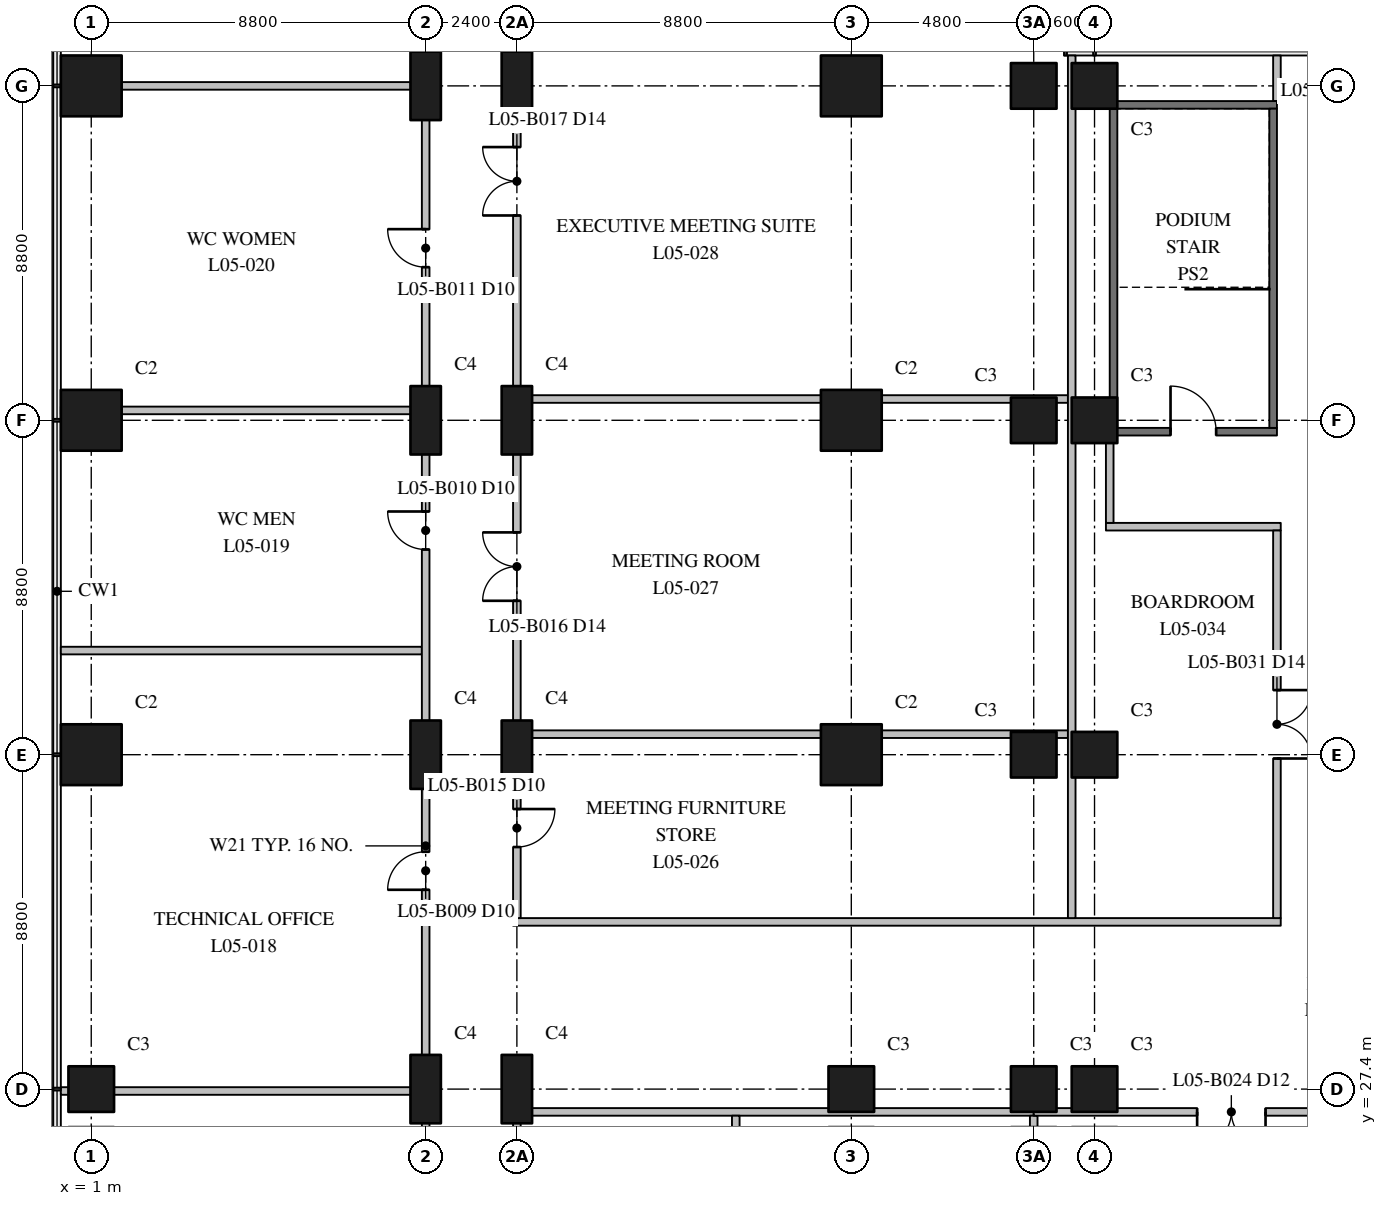
"""IFC4 building model, lengths in metres.
Left out: names, types, materials, properties, quantities, classifications, styles, units other than length and angle.
Written with IfcOpenShell. Run it as: python <this file> out.ifc"""

import sys

from ifc_helpers import new_model, si_unit, direction, frame, frame_2d, origin, origin_2d, place, context, subcontext, project, spatial, rectangle, extrude, element, fill, save


model = new_model("IFC4")
c1 = context("Model", 3, precision=1e-05, world=origin(), true_north=direction((0.0, 1.0)))
c2 = subcontext(c1, "Body", "Model", "MODEL_VIEW")
j1 = project(units=[si_unit("LENGTHUNIT", "METRE"), si_unit("PLANEANGLEUNIT", "RADIAN")], contexts=[c1])
p1 = place(None, origin())
s1 = spatial("IfcSite", under=j1, at=p1, CompositionType="ELEMENT")
p2 = place(p1, origin())
s2 = spatial("IfcBuilding", under=s1, at=p2, CompositionType="ELEMENT")
p3 = place(p2, frame((0.0, 0.0, 29.0)))
s3 = spatial("IfcBuildingStorey", under=s2, at=p3, CompositionType="ELEMENT", Elevation=29.0)
p4 = place(p3, frame((1.0, 27.4, 0.0), z_axis=(0.0, 0.0, 1.0), x_axis=(1.0, 0.0, 0.0)))
e1 = element("IfcColumn", 1, at=p4, inside=s3, PredefinedType="COLUMN", context=c2, shape_type="SweptSolid", body=[
    extrude(rectangle(XDim=1.2, YDim=1.2, at=origin_2d()), origin(), (0.0, 0.0, 1.0), 5.0),
])
for number, where, z_axis, x_axis in (
    (2, (1.0, 36.2, 0.0), (0.0, 0.0, 1.0), (1.0, 0.0, 0.0)),
    (3, (1.0, 45.0, 0.0), (0.0, 0.0, 1.0), (1.0, 0.0, 0.0)),
    (4, (1.0, 53.8, 0.0), (0.0, 0.0, 1.0), (1.0, 0.0, 0.0)),
):
    element("IfcColumn", number, at=place(p3, frame(where, z_axis=z_axis, x_axis=x_axis)), inside=s3, PredefinedType="COLUMN", context=c2, shape_type="SweptSolid", body=[
        extrude(rectangle(XDim=1.6, YDim=1.6, at=origin_2d()), origin(), (0.0, 0.0, 1.0), 5.0),
    ])
for number, where, z_axis, x_axis in (
    (5, (9.8, 27.4, 0.0), (0.0, 0.0, 1.0), (0.0, 1.0, 0.0)),
    (6, (9.8, 36.2, 0.0), (0.0, 0.0, 1.0), (0.0, 1.0, 0.0)),
    (7, (9.8, 45.0, 0.0), (0.0, 0.0, 1.0), (0.0, 1.0, 0.0)),
    (8, (9.8, 53.8, 0.0), (0.0, 0.0, 1.0), (0.0, 1.0, 0.0)),
    (9, (12.2, 27.4, 0.0), (0.0, 0.0, 1.0), (0.0, 1.0, 0.0)),
    (10, (12.2, 36.2, 0.0), (0.0, 0.0, 1.0), (0.0, 1.0, 0.0)),
    (11, (12.2, 45.0, 0.0), (0.0, 0.0, 1.0), (0.0, 1.0, 0.0)),
    (12, (12.2, 53.8, 0.0), (0.0, 0.0, 1.0), (0.0, 1.0, 0.0)),
):
    element("IfcColumn", number, at=place(p3, frame(where, z_axis=z_axis, x_axis=x_axis)), inside=s3, PredefinedType="COLUMN", context=c2, shape_type="SweptSolid", body=[
        extrude(rectangle(XDim=1.8, YDim=0.8, at=origin_2d()), origin(), (0.0, 0.0, 1.0), 5.0),
    ])
p5 = place(p3, frame((21.0, 27.4, 0.0), z_axis=(0.0, 0.0, 1.0), x_axis=(1.0, 0.0, 0.0)))
e13 = element("IfcColumn", 13, at=p5, inside=s3, PredefinedType="COLUMN", context=c2, shape_type="SweptSolid", body=[
    extrude(rectangle(XDim=1.2, YDim=1.2, at=origin_2d()), origin(), (0.0, 0.0, 1.0), 5.0),
])
for number, where, z_axis, x_axis in (
    (14, (21.0, 36.2, 0.0), (0.0, 0.0, 1.0), (1.0, 0.0, 0.0)),
    (15, (21.0, 45.0, 0.0), (0.0, 0.0, 1.0), (1.0, 0.0, 0.0)),
    (16, (21.0, 53.8, 0.0), (0.0, 0.0, 1.0), (1.0, 0.0, 0.0)),
):
    element("IfcColumn", number, at=place(p3, frame(where, z_axis=z_axis, x_axis=x_axis)), inside=s3, PredefinedType="COLUMN", context=c2, shape_type="SweptSolid", body=[
        extrude(rectangle(XDim=1.6, YDim=1.6, at=origin_2d()), origin(), (0.0, 0.0, 1.0), 5.0),
    ])
for number, where, z_axis, x_axis in (
    (17, (25.8, 27.4, 0.0), (0.0, 0.0, 1.0), (1.0, 0.0, 0.0)),
    (18, (25.8, 36.2, 0.0), (0.0, 0.0, 1.0), (1.0, 0.0, 0.0)),
    (19, (25.8, 45.0, 0.0), (0.0, 0.0, 1.0), (1.0, 0.0, 0.0)),
    (20, (25.8, 53.8, 0.0), (0.0, 0.0, 1.0), (1.0, 0.0, 0.0)),
    (21, (27.4, 27.4, 0.0), (0.0, 0.0, 1.0), (1.0, 0.0, 0.0)),
    (22, (27.4, 36.2, 0.0), (0.0, 0.0, 1.0), (1.0, 0.0, 0.0)),
    (23, (27.4, 45.0, 0.0), (0.0, 0.0, 1.0), (1.0, 0.0, 0.0)),
    (24, (27.4, 53.8, 0.0), (0.0, 0.0, 1.0), (1.0, 0.0, 0.0)),
):
    element("IfcColumn", number, at=place(p3, frame(where, z_axis=z_axis, x_axis=x_axis)), inside=s3, PredefinedType="COLUMN", context=c2, shape_type="SweptSolid", body=[
        extrude(rectangle(XDim=1.2, YDim=1.2, at=origin_2d()), origin(), (0.0, 0.0, 1.0), 5.0),
    ])
p6 = place(p3, frame((27.8, 44.7, 0.0), z_axis=(0.0, 0.0, 1.0), x_axis=(1.0, 0.0, 0.0)))
e25 = element("IfcWall", 25, at=p6, inside=s3, PredefinedType="SHEAR", context=c2, shape_type="SweptSolid", body=[
    extrude(rectangle(XDim=4.4, YDim=0.2, at=frame_2d((2.2, 0.0))), origin(), (0.0, 0.0, 1.0), 4.6),
])
p7 = place(p6, frame((1.6, 0.0, 0.0)))
e26 = element("IfcOpeningElement", 26, at=p7, cuts=e25, PredefinedType="OPENING", context=c2, shape_type="SweptSolid", body=[
    extrude(rectangle(XDim=1.2, YDim=2.1, at=frame_2d((0.6, 1.05))), frame((0.0, 0.11, 0.0), z_axis=(0.0, -1.0, 0.0), x_axis=(1.0, 0.0, 0.0)), (0.0, 0.0, 1.0), 0.22),
])
p8 = place(p3, frame((27.8, 53.3, 0.0), z_axis=(0.0, 0.0, 1.0), x_axis=(1.0, 0.0, 0.0)))
e27 = element("IfcWall", 27, at=p8, inside=s3, PredefinedType="SHEAR", context=c2, shape_type="SweptSolid", body=[
    extrude(rectangle(XDim=4.4, YDim=0.2, at=frame_2d((2.2, 0.0))), origin(), (0.0, 0.0, 1.0), 4.6),
])
for number, where, z_axis, x_axis in (
    (28, (27.9, 44.8, 0.0), (0.0, 0.0, 1.0), (0.0, 1.0, 0.0)),
    (29, (32.1, 44.8, 0.0), (0.0, 0.0, 1.0), (0.0, 1.0, 0.0)),
):
    element("IfcWall", number, at=place(p3, frame(where, z_axis=z_axis, x_axis=x_axis)), inside=s3, PredefinedType="SHEAR", context=c2, shape_type="SweptSolid", body=[
        extrude(rectangle(XDim=8.4, YDim=0.2, at=frame_2d((4.2, 0.0))), origin(), (0.0, 0.0, 1.0), 4.6),
    ])
p9 = place(p3, frame((12.1, 26.8, 0.0), z_axis=(0.0, 0.0, 1.0), x_axis=(1.0, 0.0, 0.0)))
e30 = element("IfcWall", 30, at=p9, inside=s3, PredefinedType="PARTITIONING", context=c2, shape_type="SweptSolid", body=[
    extrude(rectangle(XDim=13.7, YDim=0.2, at=frame_2d((6.85, 0.0))), origin(), (0.0, 0.0, 1.0), 4.55),
])
p10 = place(p3, frame((25.8, 26.8, 0.0), z_axis=(0.0, 0.0, 1.0), x_axis=(1.0, 0.0, 0.0)))
e31 = element("IfcWall", 31, at=p10, inside=s3, PredefinedType="PARTITIONING", context=c2, shape_type="SweptSolid", body=[
    extrude(rectangle(XDim=10.4, YDim=0.2, at=frame_2d((5.2, 0.0))), origin(), (0.0, 0.0, 1.0), 4.55),
])
p11 = place(p10, frame((4.3, 0.0, 0.0)))
e32 = element("IfcOpeningElement", 32, at=p11, cuts=e31, PredefinedType="OPENING", context=c2, shape_type="SweptSolid", body=[
    extrude(rectangle(XDim=1.8, YDim=2.1, at=frame_2d((0.9, 1.05))), frame((0.0, 0.11, 0.0), z_axis=(0.0, -1.0, 0.0), x_axis=(1.0, 0.0, 0.0)), (0.0, 0.0, 1.0), 0.22),
])
p12 = place(p3, frame((12.1, 31.8, 0.0), z_axis=(0.0, 0.0, 1.0), x_axis=(1.0, 0.0, 0.0)))
e33 = element("IfcWall", 33, at=p12, inside=s3, PredefinedType="PARTITIONING", context=c2, shape_type="SweptSolid", body=[
    extrude(rectangle(XDim=20.2, YDim=0.2, at=frame_2d((10.1, 0.0))), origin(), (0.0, 0.0, 1.0), 4.55),
])
p13 = place(p3, frame((27.7, 42.2, 0.0), z_axis=(0.0, 0.0, 1.0), x_axis=(1.0, 0.0, 0.0)))
e34 = element("IfcWall", 34, at=p13, inside=s3, PredefinedType="PARTITIONING", context=c2, shape_type="SweptSolid", body=[
    extrude(rectangle(XDim=4.6, YDim=0.2, at=frame_2d((2.3, 0.0))), origin(), (0.0, 0.0, 1.0), 4.55),
])
for number, where, z_axis, x_axis in (
    (35, (0.2, 27.35, 0.0), (0.0, 0.0, 1.0), (1.0, 0.0, 0.0)),
    (36, (0.2, 38.94, 0.0), (0.0, 0.0, 1.0), (1.0, 0.0, 0.0)),
    (37, (0.2, 45.26, 0.0), (0.0, 0.0, 1.0), (1.0, 0.0, 0.0)),
    (38, (0.2, 53.8, 0.0), (0.0, 0.0, 1.0), (1.0, 0.0, 0.0)),
):
    element("IfcWall", number, at=place(p3, frame(where, z_axis=z_axis, x_axis=x_axis)), inside=s3, PredefinedType="PARTITIONING", context=c2, shape_type="SweptSolid", body=[
        extrude(rectangle(XDim=9.5, YDim=0.2, at=frame_2d((4.75, 0.0))), origin(), (0.0, 0.0, 1.0), 4.55),
    ])
for number, where, z_axis, x_axis in (
    (39, (12.3, 36.74, 0.0), (0.0, 0.0, 1.0), (1.0, 0.0, 0.0)),
    (40, (12.3, 45.56, 0.0), (0.0, 0.0, 1.0), (1.0, 0.0, 0.0)),
):
    element("IfcWall", number, at=place(p3, frame(where, z_axis=z_axis, x_axis=x_axis)), inside=s3, PredefinedType="PARTITIONING", context=c2, shape_type="SweptSolid", body=[
        extrude(rectangle(XDim=14.4, YDim=0.2, at=frame_2d((7.2, 0.0))), origin(), (0.0, 0.0, 1.0), 4.55),
    ])
p14 = place(p3, frame((9.8, 9.8, 0.0), z_axis=(0.0, 0.0, 1.0), x_axis=(0.0, 1.0, 0.0)))
e41 = element("IfcWall", 41, at=p14, inside=s3, PredefinedType="PARTITIONING", context=c2, shape_type="SweptSolid", body=[
    extrude(rectangle(XDim=48.0, YDim=0.2, at=frame_2d((24.0, 0.0))), origin(), (0.0, 0.0, 1.0), 4.55),
])
p15 = place(p14, frame((5.02, 0.0, 0.0)))
e42 = element("IfcOpeningElement", 42, at=p15, cuts=e41, PredefinedType="OPENING", context=c2, shape_type="SweptSolid", body=[
    extrude(rectangle(XDim=1.0, YDim=2.1, at=frame_2d((0.5, 1.05))), frame((0.0, 0.11, 0.0), z_axis=(0.0, -1.0, 0.0), x_axis=(1.0, 0.0, 0.0)), (0.0, 0.0, 1.0), 0.22),
])
p16 = place(p14, frame((12.595, 0.0, 0.0)))
e43 = element("IfcOpeningElement", 43, at=p16, cuts=e41, PredefinedType="OPENING", context=c2, shape_type="SweptSolid", body=[
    extrude(rectangle(XDim=1.0, YDim=2.1, at=frame_2d((0.5, 1.05))), frame((0.0, 0.11, 0.0), z_axis=(0.0, -1.0, 0.0), x_axis=(1.0, 0.0, 0.0)), (0.0, 0.0, 1.0), 0.22),
])
p17 = place(p14, frame((22.845, 0.0, 0.0)))
e44 = element("IfcOpeningElement", 44, at=p17, cuts=e41, PredefinedType="OPENING", context=c2, shape_type="SweptSolid", body=[
    extrude(rectangle(XDim=1.0, YDim=2.1, at=frame_2d((0.5, 1.05))), frame((0.0, 0.11, 0.0), z_axis=(0.0, -1.0, 0.0), x_axis=(1.0, 0.0, 0.0)), (0.0, 0.0, 1.0), 0.22),
])
p18 = place(p14, frame((31.8, 0.0, 0.0)))
e45 = element("IfcOpeningElement", 45, at=p18, cuts=e41, PredefinedType="OPENING", context=c2, shape_type="SweptSolid", body=[
    extrude(rectangle(XDim=1.0, YDim=2.1, at=frame_2d((0.5, 1.05))), frame((0.0, 0.11, 0.0), z_axis=(0.0, -1.0, 0.0), x_axis=(1.0, 0.0, 0.0)), (0.0, 0.0, 1.0), 0.22),
])
p19 = place(p14, frame((39.23, 0.0, 0.0)))
e46 = element("IfcOpeningElement", 46, at=p19, cuts=e41, PredefinedType="OPENING", context=c2, shape_type="SweptSolid", body=[
    extrude(rectangle(XDim=1.0, YDim=2.1, at=frame_2d((0.5, 1.05))), frame((0.0, 0.11, 0.0), z_axis=(0.0, -1.0, 0.0), x_axis=(1.0, 0.0, 0.0)), (0.0, 0.0, 1.0), 0.22),
])
p20 = place(p14, frame((44.967, 0.0, 0.0)))
e47 = element("IfcOpeningElement", 47, at=p20, cuts=e41, PredefinedType="OPENING", context=c2, shape_type="SweptSolid", body=[
    extrude(rectangle(XDim=1.0, YDim=2.1, at=frame_2d((0.5, 1.05))), frame((0.0, 0.11, 0.0), z_axis=(0.0, -1.0, 0.0), x_axis=(1.0, 0.0, 0.0)), (0.0, 0.0, 1.0), 0.22),
])
p21 = place(p14, frame((0.4, 0.0, 0.0)))
e48 = element("IfcOpeningElement", 48, at=p21, cuts=e41, PredefinedType="OPENING", context=c2, shape_type="SweptSolid", body=[
    extrude(rectangle(XDim=1.0, YDim=2.1, at=frame_2d((0.5, 1.05))), frame((0.0, 0.11, 0.0), z_axis=(0.0, -1.0, 0.0), x_axis=(1.0, 0.0, 0.0)), (0.0, 0.0, 1.0), 0.22),
])
p22 = place(p3, frame((12.2, 12.3, 0.0), z_axis=(0.0, 0.0, 1.0), x_axis=(0.0, 1.0, 0.0)))
e49 = element("IfcWall", 49, at=p22, inside=s3, PredefinedType="PARTITIONING", context=c2, shape_type="SweptSolid", body=[
    extrude(rectangle(XDim=14.4, YDim=0.2, at=frame_2d((7.2, 0.0))), origin(), (0.0, 0.0, 1.0), 4.55),
])
p23 = place(p3, frame((12.2, 31.9, 0.0), z_axis=(0.0, 0.0, 1.0), x_axis=(0.0, 1.0, 0.0)))
e50 = element("IfcWall", 50, at=p23, inside=s3, PredefinedType="PARTITIONING", context=c2, shape_type="SweptSolid", body=[
    extrude(rectangle(XDim=46.3, YDim=0.2, at=frame_2d((23.15, 0.0))), origin(), (0.0, 0.0, 1.0), 4.55),
])
p24 = place(p23, frame((1.87, 0.0, 0.0)))
e51 = element("IfcOpeningElement", 51, at=p24, cuts=e50, PredefinedType="OPENING", context=c2, shape_type="SweptSolid", body=[
    extrude(rectangle(XDim=1.0, YDim=2.1, at=frame_2d((0.5, 1.05))), frame((0.0, 0.11, 0.0), z_axis=(0.0, -1.0, 0.0), x_axis=(1.0, 0.0, 0.0)), (0.0, 0.0, 1.0), 0.22),
])
p25 = place(p23, frame((8.35, 0.0, 0.0)))
e52 = element("IfcOpeningElement", 52, at=p25, cuts=e50, PredefinedType="OPENING", context=c2, shape_type="SweptSolid", body=[
    extrude(rectangle(XDim=1.8, YDim=2.4, at=frame_2d((0.9, 1.2))), frame((0.0, 0.11, 0.0), z_axis=(0.0, -1.0, 0.0), x_axis=(1.0, 0.0, 0.0)), (0.0, 0.0, 1.0), 0.22),
])
p26 = place(p23, frame((18.49, 0.0, 0.0)))
e53 = element("IfcOpeningElement", 53, at=p26, cuts=e50, PredefinedType="OPENING", context=c2, shape_type="SweptSolid", body=[
    extrude(rectangle(XDim=1.8, YDim=2.4, at=frame_2d((0.9, 1.2))), frame((0.0, 0.11, 0.0), z_axis=(0.0, -1.0, 0.0), x_axis=(1.0, 0.0, 0.0)), (0.0, 0.0, 1.0), 0.22),
])
p27 = place(p23, frame((27.955, 0.0, 0.0)))
e54 = element("IfcOpeningElement", 54, at=p27, cuts=e50, PredefinedType="OPENING", context=c2, shape_type="SweptSolid", body=[
    extrude(rectangle(XDim=1.8, YDim=2.4, at=frame_2d((0.9, 1.2))), frame((0.0, 0.11, 0.0), z_axis=(0.0, -1.0, 0.0), x_axis=(1.0, 0.0, 0.0)), (0.0, 0.0, 1.0), 0.22),
])
p28 = place(p23, frame((36.76, 0.0, 0.0)))
e55 = element("IfcOpeningElement", 55, at=p28, cuts=e50, PredefinedType="OPENING", context=c2, shape_type="SweptSolid", body=[
    extrude(rectangle(XDim=1.8, YDim=2.4, at=frame_2d((0.9, 1.2))), frame((0.0, 0.11, 0.0), z_axis=(0.0, -1.0, 0.0), x_axis=(1.0, 0.0, 0.0)), (0.0, 0.0, 1.0), 0.22),
])
p29 = place(p23, frame((43.815, 0.0, 0.0)))
e56 = element("IfcOpeningElement", 56, at=p29, cuts=e50, PredefinedType="OPENING", context=c2, shape_type="SweptSolid", body=[
    extrude(rectangle(XDim=1.8, YDim=2.1, at=frame_2d((0.9, 1.05))), frame((0.0, 0.11, 0.0), z_axis=(0.0, -1.0, 0.0), x_axis=(1.0, 0.0, 0.0)), (0.0, 0.0, 1.0), 0.22),
])
p30 = place(p3, frame((32.2, 31.9, 0.0), z_axis=(0.0, 0.0, 1.0), x_axis=(0.0, 1.0, 0.0)))
e57 = element("IfcWall", 57, at=p30, inside=s3, PredefinedType="PARTITIONING", context=c2, shape_type="SweptSolid", body=[
    extrude(rectangle(XDim=10.2, YDim=0.2, at=frame_2d((5.1, 0.0))), origin(), (0.0, 0.0, 1.0), 4.55),
])
p31 = place(p30, frame((4.2, 0.0, 0.0)))
e58 = element("IfcOpeningElement", 58, at=p31, cuts=e57, PredefinedType="OPENING", context=c2, shape_type="SweptSolid", body=[
    extrude(rectangle(XDim=1.8, YDim=2.4, at=frame_2d((0.9, 1.2))), frame((0.0, 0.11, 0.0), z_axis=(0.0, -1.0, 0.0), x_axis=(1.0, 0.0, 0.0)), (0.0, 0.0, 1.0), 0.22),
])
p32 = place(p3, frame((32.2, 53.4, 0.0), z_axis=(0.0, 0.0, 1.0), x_axis=(0.0, 1.0, 0.0)))
e59 = element("IfcWall", 59, at=p32, inside=s3, PredefinedType="PARTITIONING", context=c2, shape_type="SweptSolid", body=[
    extrude(rectangle(XDim=1.2, YDim=0.2, at=frame_2d((0.6, 0.0))), origin(), (0.0, 0.0, 1.0), 4.55),
])
p33 = place(p3, frame((27.8, 42.3, 0.0), z_axis=(0.0, 0.0, 1.0), x_axis=(0.0, 1.0, 0.0)))
e60 = element("IfcWall", 60, at=p33, inside=s3, PredefinedType="PARTITIONING", context=c2, shape_type="SweptSolid", body=[
    extrude(rectangle(XDim=2.3, YDim=0.2, at=frame_2d((1.15, 0.0))), origin(), (0.0, 0.0, 1.0), 4.55),
])
for number, where, z_axis, x_axis in (
    (61, (17.96, 12.3, 0.0), (0.0, 0.0, 1.0), (0.0, 1.0, 0.0)),
    (62, (25.8, 12.3, 0.0), (0.0, 0.0, 1.0), (0.0, 1.0, 0.0)),
):
    element("IfcWall", number, at=place(p3, frame(where, z_axis=z_axis, x_axis=x_axis)), inside=s3, PredefinedType="PARTITIONING", context=c2, shape_type="SweptSolid", body=[
        extrude(rectangle(XDim=14.4, YDim=0.2, at=frame_2d((7.2, 0.0))), origin(), (0.0, 0.0, 1.0), 4.55),
    ])
p34 = place(p3, frame((26.8, 31.9, 0.0), z_axis=(0.0, 0.0, 1.0), x_axis=(0.0, 1.0, 0.0)))
e63 = element("IfcWall", 63, at=p34, inside=s3, PredefinedType="PARTITIONING", context=c2, shape_type="SweptSolid", body=[
    extrude(rectangle(XDim=22.7, YDim=0.2, at=frame_2d((11.35, 0.0))), origin(), (0.0, 0.0, 1.0), 4.55),
])
p35 = place(p7, origin())
e64 = element("IfcDoor", 64, at=p35, inside=s3, OperationType="SINGLE_SWING_LEFT", PredefinedType="DOOR", context=c2, shape_type="SweptSolid", body=[
    extrude(rectangle(XDim=1.2, YDim=2.1, at=frame_2d((0.6, 1.05))), frame((0.0, 0.025, 0.0), z_axis=(0.0, -1.0, 0.0), x_axis=(1.0, 0.0, 0.0)), (0.0, 0.0, 1.0), 0.05),
])
fill(e26, e64)
p36 = place(p17, origin())
e65 = element("IfcDoor", 65, at=p36, inside=s3, OperationType="SINGLE_SWING_LEFT", PredefinedType="DOOR", context=c2, shape_type="SweptSolid", body=[
    extrude(rectangle(XDim=1.0, YDim=2.1, at=frame_2d((0.5, 1.05))), frame((0.0, 0.025, 0.0), z_axis=(0.0, -1.0, 0.0), x_axis=(1.0, 0.0, 0.0)), (0.0, 0.0, 1.0), 0.05),
])
fill(e44, e65)
p37 = place(p18, origin())
e66 = element("IfcDoor", 66, at=p37, inside=s3, OperationType="SINGLE_SWING_RIGHT", PredefinedType="DOOR", context=c2, shape_type="SweptSolid", body=[
    extrude(rectangle(XDim=1.0, YDim=2.1, at=frame_2d((0.5, 1.05))), frame((0.0, 0.025, 0.0), z_axis=(0.0, -1.0, 0.0), x_axis=(1.0, 0.0, 0.0)), (0.0, 0.0, 1.0), 0.05),
])
fill(e45, e66)
p38 = place(p19, origin())
e67 = element("IfcDoor", 67, at=p38, inside=s3, OperationType="SINGLE_SWING_RIGHT", PredefinedType="DOOR", context=c2, shape_type="SweptSolid", body=[
    extrude(rectangle(XDim=1.0, YDim=2.1, at=frame_2d((0.5, 1.05))), frame((0.0, 0.025, 0.0), z_axis=(0.0, -1.0, 0.0), x_axis=(1.0, 0.0, 0.0)), (0.0, 0.0, 1.0), 0.05),
])
fill(e46, e67)
p39 = place(p24, frame((1.0, 0.0, 0.0), z_axis=(0.0, 0.0, 1.0), x_axis=(-1.0, 0.0, 0.0)))
e68 = element("IfcDoor", 68, at=p39, inside=s3, OperationType="SINGLE_SWING_RIGHT", PredefinedType="DOOR", context=c2, shape_type="SweptSolid", body=[
    extrude(rectangle(XDim=1.0, YDim=2.1, at=frame_2d((0.5, 1.05))), frame((0.0, 0.025, 0.0), z_axis=(0.0, -1.0, 0.0), x_axis=(1.0, 0.0, 0.0)), (0.0, 0.0, 1.0), 0.05),
])
fill(e51, e68)
p40 = place(p25, origin())
e69 = element("IfcDoor", 69, at=p40, inside=s3, OperationType="DOUBLE_DOOR_SINGLE_SWING", PredefinedType="DOOR", context=c2, shape_type="SweptSolid", body=[
    extrude(rectangle(XDim=1.8, YDim=2.4, at=frame_2d((0.9, 1.2))), frame((0.0, 0.025, 0.0), z_axis=(0.0, -1.0, 0.0), x_axis=(1.0, 0.0, 0.0)), (0.0, 0.0, 1.0), 0.05),
])
fill(e52, e69)
p41 = place(p26, origin())
e70 = element("IfcDoor", 70, at=p41, inside=s3, OperationType="DOUBLE_DOOR_SINGLE_SWING", PredefinedType="DOOR", context=c2, shape_type="SweptSolid", body=[
    extrude(rectangle(XDim=1.8, YDim=2.4, at=frame_2d((0.9, 1.2))), frame((0.0, 0.025, 0.0), z_axis=(0.0, -1.0, 0.0), x_axis=(1.0, 0.0, 0.0)), (0.0, 0.0, 1.0), 0.05),
])
fill(e53, e70)
p42 = place(p11, frame((1.8, 0.0, 0.0), z_axis=(0.0, 0.0, 1.0), x_axis=(-1.0, 0.0, 0.0)))
e71 = element("IfcDoor", 71, at=p42, inside=s3, OperationType="DOUBLE_DOOR_SINGLE_SWING", PredefinedType="DOOR", context=c2, shape_type="SweptSolid", body=[
    extrude(rectangle(XDim=1.8, YDim=2.1, at=frame_2d((0.9, 1.05))), frame((0.0, 0.025, 0.0), z_axis=(0.0, -1.0, 0.0), x_axis=(1.0, 0.0, 0.0)), (0.0, 0.0, 1.0), 0.05),
])
fill(e32, e71)
p43 = place(p31, frame((1.8, 0.0, 0.0), z_axis=(0.0, 0.0, 1.0), x_axis=(-1.0, 0.0, 0.0)))
e72 = element("IfcDoor", 72, at=p43, inside=s3, OperationType="DOUBLE_DOOR_SINGLE_SWING", PredefinedType="DOOR", context=c2, shape_type="SweptSolid", body=[
    extrude(rectangle(XDim=1.8, YDim=2.4, at=frame_2d((0.9, 1.2))), frame((0.0, 0.025, 0.0), z_axis=(0.0, -1.0, 0.0), x_axis=(1.0, 0.0, 0.0)), (0.0, 0.0, 1.0), 0.05),
])
fill(e58, e72)
save(model, sys.argv[1])
